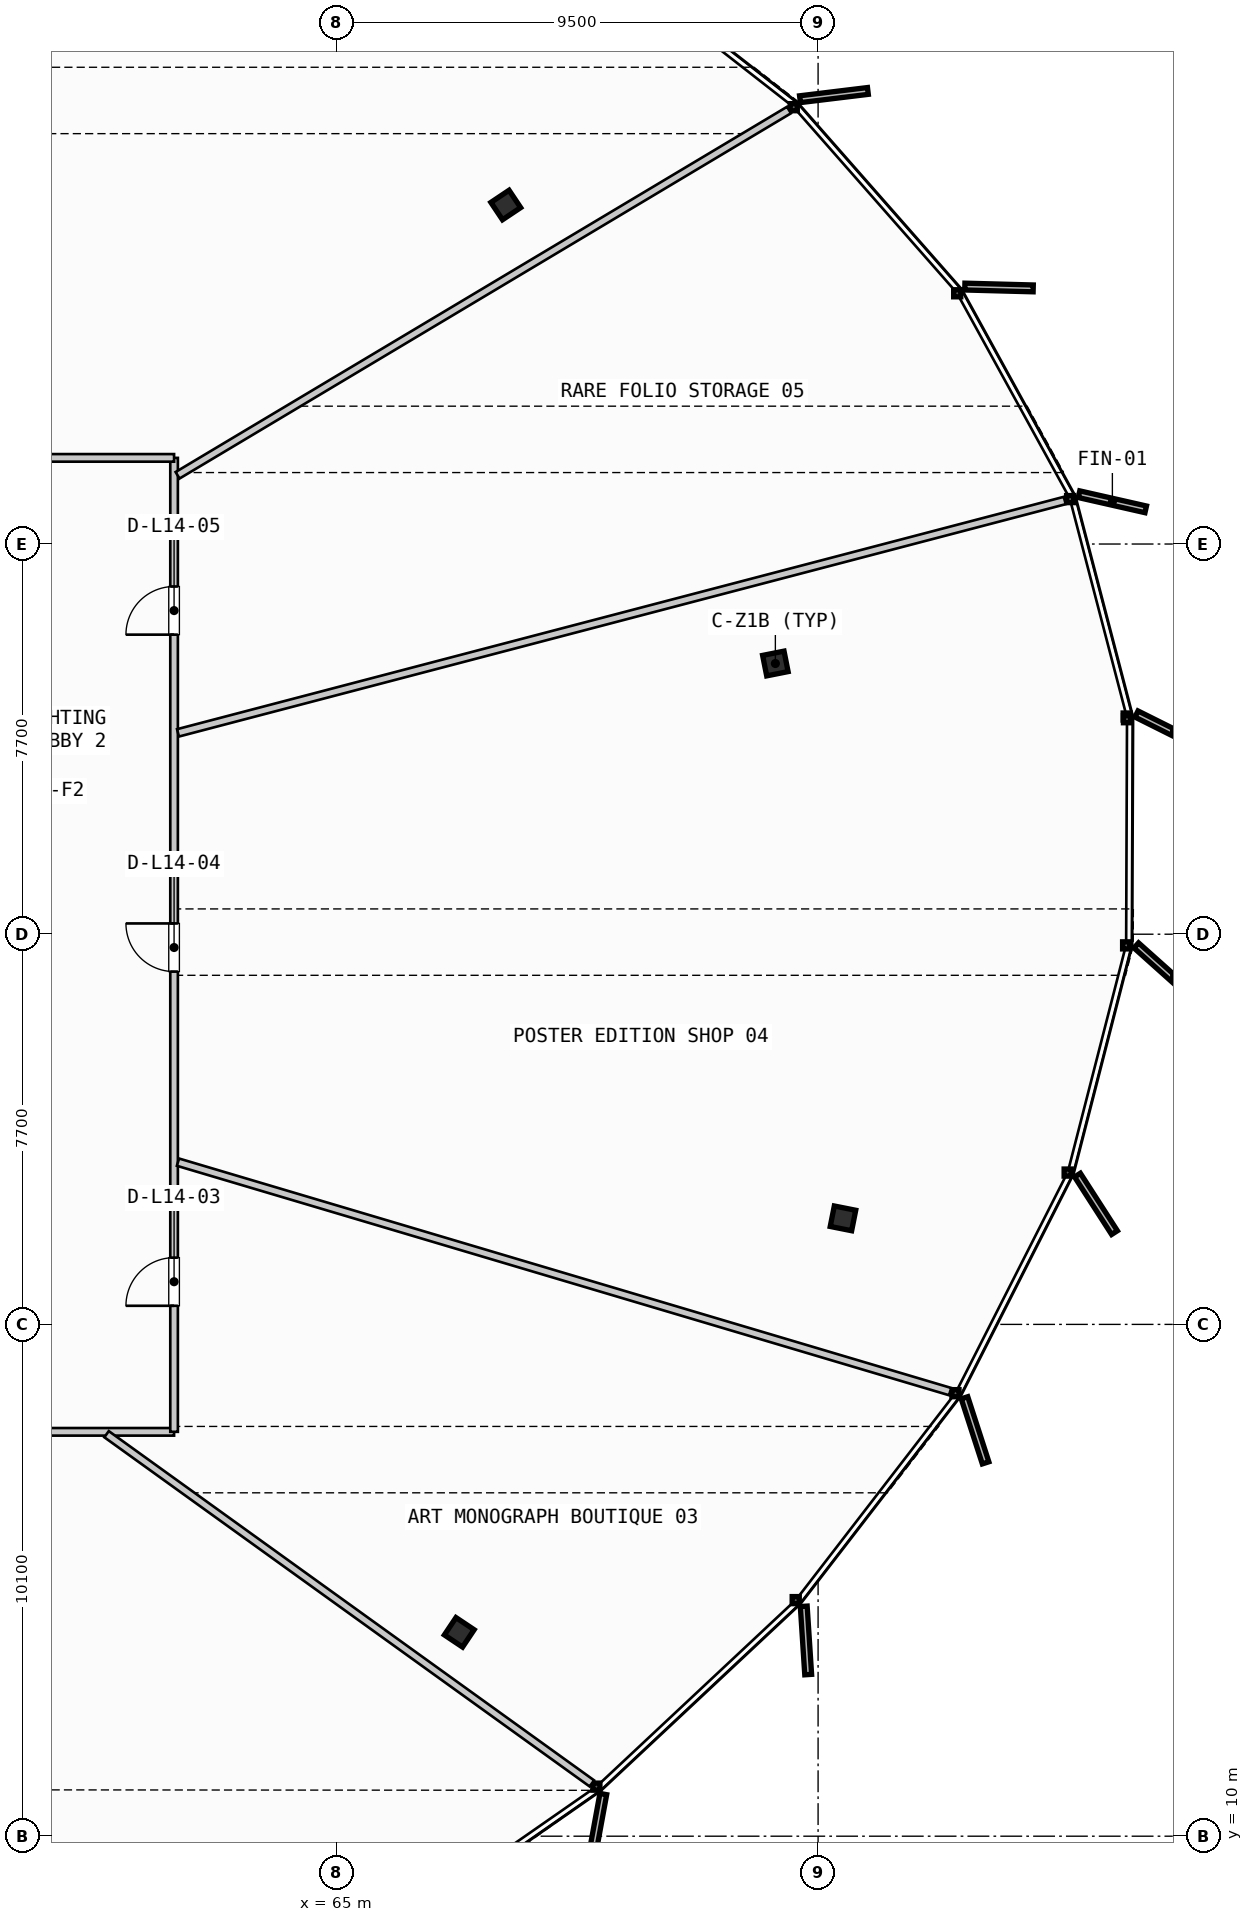
"""IFC4 building model, lengths in metres.
Left out: names, types, materials, properties, quantities, classifications, styles, units other than length and angle.
Written with IfcOpenShell. Run it as: python <this file> out.ifc"""

import sys

from ifc_helpers import new_model, si_unit, direction, frame, frame_2d, origin, origin_2d, place, context, subcontext, project, spatial, rectangle, i_section, extrude, source, transform, mapped, element, fill, save


model = new_model("IFC4")
c1 = context("Model", 3, precision=1e-05, world=origin(), true_north=direction((0.0, 1.0)))
c2 = subcontext(c1, "Body", "Model", "MODEL_VIEW")
j1 = project(units=[si_unit("LENGTHUNIT", "METRE"), si_unit("PLANEANGLEUNIT", "RADIAN")], contexts=[c1])
p1 = place(None, origin())
s1 = spatial("IfcSite", under=j1, at=p1, CompositionType="ELEMENT")
p2 = place(p1, origin())
s2 = spatial("IfcBuilding", under=s1, at=p2, CompositionType="ELEMENT")
p3 = place(p2, frame((0.0, 0.0, 60.0)))
s3 = spatial("IfcBuildingStorey", under=s2, at=p3, CompositionType="ELEMENT", Elevation=60.0)
m1 = source(origin(), c2, "Body", "SweptSolid", [
    extrude(i_section(OverallWidth=0.412, OverallDepth=0.431, WebThickness=0.042, FlangeThickness=0.068, FilletRadius=0.015, at=origin_2d()), origin(), (0.0, 0.0, 1.0), 3.55),
])
for number, where, z_axis, x_axis in (
    (1, (73.657, 33.142, 0.0), (0.0, 0.0, 1.0), (0.981, 0.195, 0.0)),
    (2, (68.336, 42.19, 0.0), (0.0, 0.0, 1.0), (0.831, 0.556, 0.0)),
    (3, (67.418, 14.023, 0.0), (0.0, 0.0, 1.0), (0.831, -0.556, 0.0)),
    (4, (74.991, 22.192, 0.0), (0.0, 0.0, 1.0), (0.981, -0.195, 0.0)),
):
    element("IfcColumn", number, at=place(p3, frame(where, z_axis=z_axis, x_axis=x_axis)), inside=s3, PredefinedType="COLUMN", context=c2, shape_type="MappedRepresentation", body=[
        mapped(m1, transform((0.0, 0.0, 0.0), scale=1.0)),
    ])
p4 = place(p3, frame((31.81, 17.98, 0.0), z_axis=(0.0, 0.0, 1.0), x_axis=(1.0, 0.0, 0.0)))
e5 = element("IfcWall", 5, at=p4, inside=s3, PredefinedType="PARTITIONING", context=c2, shape_type="SweptSolid", body=[
    extrude(rectangle(XDim=29.98, YDim=0.15, at=frame_2d((14.99, 0.0))), origin(), (0.0, 0.0, 1.0), 2.645),
])
p5 = place(p4, frame((7.461, 0.0, 0.0)))
e6 = element("IfcOpeningElement", 6, at=p5, cuts=e5, PredefinedType="OPENING", context=c2, shape_type="SweptSolid", body=[
    extrude(rectangle(XDim=0.95, YDim=2.15, at=frame_2d((0.475, 1.075))), frame((0.0, 0.085, 0.0), z_axis=(0.0, -1.0, 0.0), x_axis=(1.0, 0.0, 0.0)), (0.0, 0.0, 1.0), 0.17),
])
p6 = place(p4, frame((19.927, 0.0, 0.0)))
e7 = element("IfcOpeningElement", 7, at=p6, cuts=e5, PredefinedType="OPENING", context=c2, shape_type="SweptSolid", body=[
    extrude(rectangle(XDim=0.95, YDim=2.15, at=frame_2d((0.475, 1.075))), frame((0.0, 0.085, 0.0), z_axis=(0.0, -1.0, 0.0), x_axis=(1.0, 0.0, 0.0)), (0.0, 0.0, 1.0), 0.17),
])
p7 = place(p3, frame((61.79, 17.98, 0.0), z_axis=(0.0, 0.0, 1.0), x_axis=(0.0, 1.0, 0.0)))
e8 = element("IfcWall", 8, at=p7, inside=s3, PredefinedType="PARTITIONING", context=c2, shape_type="SweptSolid", body=[
    extrude(rectangle(XDim=19.22, YDim=0.15, at=frame_2d((9.61, 0.0))), origin(), (0.0, 0.0, 1.0), 2.645),
])
p8 = place(p7, frame((2.487, 0.0, 0.0)))
e9 = element("IfcOpeningElement", 9, at=p8, cuts=e8, PredefinedType="OPENING", context=c2, shape_type="SweptSolid", body=[
    extrude(rectangle(XDim=0.95, YDim=2.15, at=frame_2d((0.475, 1.075))), frame((0.0, 0.085, 0.0), z_axis=(0.0, -1.0, 0.0), x_axis=(1.0, 0.0, 0.0)), (0.0, 0.0, 1.0), 0.17),
])
p9 = place(p7, frame((9.083, 0.0, 0.0)))
e10 = element("IfcOpeningElement", 10, at=p9, cuts=e8, PredefinedType="OPENING", context=c2, shape_type="SweptSolid", body=[
    extrude(rectangle(XDim=0.95, YDim=2.15, at=frame_2d((0.475, 1.075))), frame((0.0, 0.085, 0.0), z_axis=(0.0, -1.0, 0.0), x_axis=(1.0, 0.0, 0.0)), (0.0, 0.0, 1.0), 0.17),
])
p10 = place(p7, frame((15.732, 0.0, 0.0)))
e11 = element("IfcOpeningElement", 11, at=p10, cuts=e8, PredefinedType="OPENING", context=c2, shape_type="SweptSolid", body=[
    extrude(rectangle(XDim=0.95, YDim=2.15, at=frame_2d((0.475, 1.075))), frame((0.0, 0.085, 0.0), z_axis=(0.0, -1.0, 0.0), x_axis=(1.0, 0.0, 0.0)), (0.0, 0.0, 1.0), 0.17),
])
p11 = place(p3, frame((61.79, 37.2, 0.0), z_axis=(0.0, 0.0, 1.0), x_axis=(-1.0, 0.0, 0.0)))
e12 = element("IfcWall", 12, at=p11, inside=s3, PredefinedType="PARTITIONING", context=c2, shape_type="SweptSolid", body=[
    extrude(rectangle(XDim=29.98, YDim=0.15, at=frame_2d((14.99, 0.0))), origin(), (0.0, 0.0, 1.0), 2.645),
])
p12 = place(p11, frame((5.862, 0.0, 0.0)))
e13 = element("IfcOpeningElement", 13, at=p12, cuts=e12, PredefinedType="OPENING", context=c2, shape_type="SweptSolid", body=[
    extrude(rectangle(XDim=0.95, YDim=2.15, at=frame_2d((0.475, 1.075))), frame((0.0, 0.085, 0.0), z_axis=(0.0, -1.0, 0.0), x_axis=(1.0, 0.0, 0.0)), (0.0, 0.0, 1.0), 0.17),
])
p13 = place(p11, frame((14.719, 0.0, 0.0)))
e14 = element("IfcOpeningElement", 14, at=p13, cuts=e12, PredefinedType="OPENING", context=c2, shape_type="SweptSolid", body=[
    extrude(rectangle(XDim=0.95, YDim=2.15, at=frame_2d((0.475, 1.075))), frame((0.0, 0.085, 0.0), z_axis=(0.0, -1.0, 0.0), x_axis=(1.0, 0.0, 0.0)), (0.0, 0.0, 1.0), 0.17),
])
p14 = place(p11, frame((23.37, 0.0, 0.0)))
e15 = element("IfcOpeningElement", 15, at=p14, cuts=e12, PredefinedType="OPENING", context=c2, shape_type="SweptSolid", body=[
    extrude(rectangle(XDim=0.95, YDim=2.15, at=frame_2d((0.475, 1.075))), frame((0.0, 0.085, 0.0), z_axis=(0.0, -1.0, 0.0), x_axis=(1.0, 0.0, 0.0)), (0.0, 0.0, 1.0), 0.17),
])
p15 = place(p3, frame((60.458, 17.933, 0.0), z_axis=(0.0, 0.0, 1.0), x_axis=(0.811709736276, -0.584061044785, 0.0)))
e16 = element("IfcWall", 16, at=p15, inside=s3, PredefinedType="PARTITIONING", context=c2, shape_type="SweptSolid", body=[
    extrude(rectangle(XDim=11.799, YDim=0.15, at=frame_2d((5.899, 0.0))), origin(), (0.0, 0.0, 1.0), 2.645),
])
p16 = place(p3, frame((61.867, 23.302, 0.0), z_axis=(0.0, 0.0, 1.0), x_axis=(0.958583733274, -0.284810860578, 0.0)))
e17 = element("IfcWall", 17, at=p16, inside=s3, PredefinedType="PARTITIONING", context=c2, shape_type="SweptSolid", body=[
    extrude(rectangle(XDim=15.898, YDim=0.15, at=frame_2d((7.949, 0.0))), origin(), (0.0, 0.0, 1.0), 2.645),
])
p17 = place(p3, frame((61.867, 31.773, 0.0), z_axis=(0.0, 0.0, 1.0), x_axis=(0.96734528528, 0.253462224103, 0.0)))
e18 = element("IfcWall", 18, at=p17, inside=s3, PredefinedType="PARTITIONING", context=c2, shape_type="SweptSolid", body=[
    extrude(rectangle(XDim=18.091, YDim=0.15, at=frame_2d((9.046, 0.0))), origin(), (0.0, 0.0, 1.0), 2.645),
])
p18 = place(p3, frame((61.859, 36.856, 0.0), z_axis=(0.0, 0.0, 1.0), x_axis=(0.858502804346, 0.512808867834, 0.0)))
e19 = element("IfcWall", 19, at=p18, inside=s3, PredefinedType="PARTITIONING", context=c2, shape_type="SweptSolid", body=[
    extrude(rectangle(XDim=14.055, YDim=0.15, at=frame_2d((7.028, 0.0))), origin(), (0.0, 0.0, 1.0), 2.645),
])
m2 = source(origin(), c2, "Body", "SweptSolid", [
    extrude(rectangle(XDim=0.95, YDim=2.15, at=frame_2d((0.475, 1.075))), frame((0.0, 0.025, 0.0), z_axis=(0.0, -1.0, 0.0), x_axis=(1.0, 0.0, 0.0)), (0.0, 0.0, 1.0), 0.05),
])
p19 = place(p8, origin())
e20 = element("IfcDoor", 20, at=p19, inside=s3, OperationType="SINGLE_SWING_LEFT", PredefinedType="DOOR", context=c2, shape_type="MappedRepresentation", body=[
    mapped(m2, transform((0.0, 0.0, 0.0), scale=1.0)),
])
fill(e9, e20)
p20 = place(p9, origin())
e21 = element("IfcDoor", 21, at=p20, inside=s3, OperationType="SINGLE_SWING_RIGHT", PredefinedType="DOOR", context=c2, shape_type="MappedRepresentation", body=[
    mapped(m2, transform((0.0, 0.0, 0.0), scale=1.0)),
])
fill(e10, e21)
p21 = place(p10, origin())
e22 = element("IfcDoor", 22, at=p21, inside=s3, OperationType="SINGLE_SWING_LEFT", PredefinedType="DOOR", context=c2, shape_type="MappedRepresentation", body=[
    mapped(m2, transform((0.0, 0.0, 0.0), scale=1.0)),
])
fill(e11, e22)
save(model, sys.argv[1])
